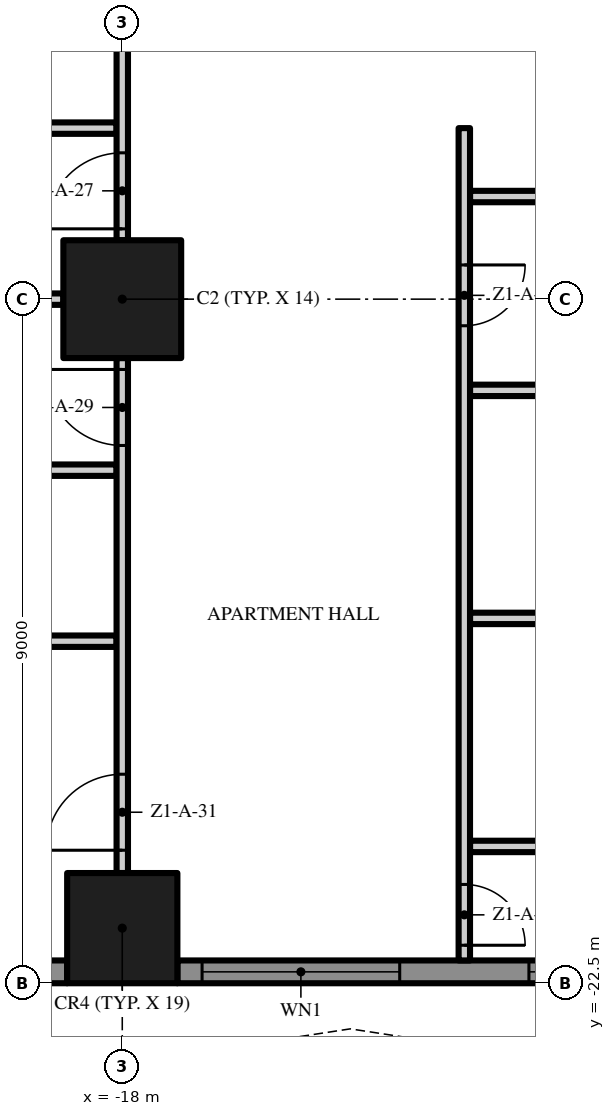
"""IFC4 building model, lengths in metres.
Left out: names, types, materials, properties, quantities, classifications, styles, units other than length and angle.
Written with IfcOpenShell. Run it as: python <this file> out.ifc"""

import sys

from ifc_helpers import new_model, si_unit, direction, frame, frame_2d, origin, origin_2d, place, context, subcontext, project, spatial, polyline, rectangle, outline, extrude, element, fill, save


model = new_model("IFC4")
c1 = context("Model", 3, precision=1e-05, world=origin(), true_north=direction((0.0, 1.0)))
c2 = subcontext(c1, "Body", "Model", "MODEL_VIEW")
j1 = project(units=[si_unit("LENGTHUNIT", "METRE"), si_unit("PLANEANGLEUNIT", "RADIAN")], contexts=[c1])
p1 = place(None, origin())
s1 = spatial("IfcSite", under=j1, at=p1, CompositionType="ELEMENT")
p2 = place(p1, origin())
s2 = spatial("IfcBuilding", under=s1, at=p2, CompositionType="ELEMENT")
p3 = place(p2, frame((0.0, 0.0, 22.6)))
s3 = spatial("IfcBuildingStorey", under=s2, at=p3, CompositionType="ELEMENT", Elevation=22.6)
p4 = place(p3, frame((-18.0, -13.5, 0.0), z_axis=(0.0, 0.0, 1.0), x_axis=(1.0, 0.0, 0.0)))
e1 = element("IfcColumn", 1, at=p4, inside=s3, PredefinedType="COLUMN", context=c2, shape_type="SweptSolid", body=[
    extrude(rectangle(XDim=1.55, YDim=1.55, at=origin_2d()), origin(), (0.0, 0.0, 1.0), 3.5),
])
p5 = place(p3, frame((-18.0, -21.775, 0.0), z_axis=(0.0, 0.0, 1.0), x_axis=(1.0, 0.0, 0.0)))
e2 = element("IfcColumn", 2, at=p5, inside=s3, PredefinedType="COLUMN", context=c2, shape_type="SweptSolid", body=[
    extrude(rectangle(XDim=1.45, YDim=1.45, at=origin_2d()), origin(), (0.0, 0.0, 1.0), 3.5),
])
p6 = place(p3, frame((-18.725, -22.35, 0.0), z_axis=(0.0, 0.0, 1.0), x_axis=(-1.0, 0.0, 0.0)))
e3 = element("IfcWall", 3, at=p6, inside=s3, PredefinedType="SOLIDWALL", context=c2, shape_type="SweptSolid", body=[
    extrude(rectangle(XDim=3.475, YDim=0.3, at=frame_2d((1.738, 0.0))), origin(), (0.0, 0.0, 1.0), 3.5),
])
p7 = place(p6, frame((0.325, 0.0, 0.0)))
e4 = element("IfcOpeningElement", 4, at=p7, cuts=e3, PredefinedType="OPENING", context=c2, shape_type="SweptSolid", body=[
    extrude(rectangle(XDim=2.6, YDim=2.4, at=frame_2d((1.3, 1.2))), frame((0.0, 0.16, 0.0), z_axis=(0.0, -1.0, 0.0), x_axis=(1.0, 0.0, 0.0)), (0.0, 0.0, 1.0), 0.32),
])
p8 = place(p3, frame((-9.725, -22.35, 0.0), z_axis=(0.0, 0.0, 1.0), x_axis=(-1.0, 0.0, 0.0)))
e5 = element("IfcWall", 5, at=p8, inside=s3, PredefinedType="SOLIDWALL", context=c2, shape_type="SweptSolid", body=[
    extrude(rectangle(XDim=7.55, YDim=0.3, at=frame_2d((3.775, 0.0))), origin(), (0.0, 0.0, 1.0), 3.5),
])
p9 = place(p8, frame((4.625, 0.0, 0.45)))
e6 = element("IfcOpeningElement", 6, at=p9, cuts=e5, PredefinedType="OPENING", context=c2, shape_type="SweptSolid", body=[
    extrude(rectangle(XDim=2.6, YDim=2.65, at=frame_2d((1.3, 1.325))), frame((0.0, 0.16, 0.0), z_axis=(0.0, -1.0, 0.0), x_axis=(1.0, 0.0, 0.0)), (0.0, 0.0, 1.0), 0.32),
])
p10 = place(p8, frame((0.325, 0.0, 0.45)))
e7 = element("IfcOpeningElement", 7, at=p10, cuts=e5, PredefinedType="OPENING", context=c2, shape_type="SweptSolid", body=[
    extrude(rectangle(XDim=2.6, YDim=2.65, at=frame_2d((1.3, 1.325))), frame((0.0, 0.16, 0.0), z_axis=(0.0, -1.0, 0.0), x_axis=(1.0, 0.0, 0.0)), (0.0, 0.0, 1.0), 0.32),
])
p11 = place(p3, origin())
e8 = element("IfcWall", 8, at=p11, inside=s3, PredefinedType="USERDEFINED", context=c2, shape_type="SweptSolid", body=[
    extrude(outline(polyline([(-22.5, -25.5), (-21.0, -25.271), (-19.5, -24.671), (-18.0, -23.929), (-16.5, -23.329), (-15.0, -23.1), (-13.5, -23.329), (-12.0, -23.929), (-10.5, -24.671), (-9.0, -25.271), (-7.5, -25.5), (-6.0, -25.271), (-4.5, -24.671), (-3.0, -23.929), (-1.5, -23.329), (0.0, -23.1), (1.5, -23.329), (3.0, -23.929), (4.5, -24.671), (6.0, -25.271), (7.5, -25.5), (9.0, -25.271), (10.5, -24.671), (12.0, -23.929), (13.5, -23.329), (15.0, -23.1), (16.5, -23.329), (18.0, -23.929), (19.5, -24.671), (21.0, -25.271), (22.5, -25.5), (22.538, -25.253), (21.066, -25.028), (19.602, -24.442), (18.102, -23.701), (16.566, -23.086), (15.0, -22.847), (13.434, -23.086), (11.898, -23.701), (10.398, -24.442), (8.934, -25.028), (7.5, -25.247), (6.066, -25.028), (4.602, -24.442), (3.102, -23.701), (1.566, -23.086), (0.0, -22.847), (-1.566, -23.086), (-3.102, -23.701), (-4.602, -24.442), (-6.066, -25.028), (-7.5, -25.247), (-8.934, -25.028), (-10.398, -24.442), (-11.898, -23.701), (-13.434, -23.086), (-15.0, -22.847), (-16.566, -23.086), (-18.102, -23.701), (-19.602, -24.442), (-21.066, -25.028), (-22.538, -25.253), (-22.5, -25.5)])), origin(), (0.0, 0.0, 1.0), 0.9),
])
p12 = place(p3, frame((-13.425, -20.7, 0.0), z_axis=(0.0, 0.0, 1.0), x_axis=(1.0, 0.0, 0.0)))
e9 = element("IfcWall", 9, at=p12, inside=s3, PredefinedType="PARTITIONING", context=c2, shape_type="SweptSolid", body=[
    extrude(rectangle(XDim=4.35, YDim=0.15, at=frame_2d((2.175, 0.0))), origin(), (0.0, 0.0, 1.0), 3.5),
])
p13 = place(p3, frame((-21.775, -18.0, 0.0), z_axis=(0.0, 0.0, 1.0), x_axis=(1.0, 0.0, 0.0)))
e10 = element("IfcWall", 10, at=p13, inside=s3, PredefinedType="PARTITIONING", context=c2, shape_type="SweptSolid", body=[
    extrude(rectangle(XDim=3.7, YDim=0.15, at=frame_2d((1.85, 0.0))), origin(), (0.0, 0.0, 1.0), 3.5),
])
p14 = place(p3, frame((-13.425, -17.7, 0.0), z_axis=(0.0, 0.0, 1.0), x_axis=(1.0, 0.0, 0.0)))
e11 = element("IfcWall", 11, at=p14, inside=s3, PredefinedType="PARTITIONING", context=c2, shape_type="SweptSolid", body=[
    extrude(rectangle(XDim=4.35, YDim=0.15, at=frame_2d((2.175, 0.0))), origin(), (0.0, 0.0, 1.0), 3.5),
])
p15 = place(p3, frame((-20.925, -15.75, 0.0), z_axis=(0.0, 0.0, 1.0), x_axis=(1.0, 0.0, 0.0)))
e12 = element("IfcWall", 12, at=p15, inside=s3, PredefinedType="PARTITIONING", context=c2, shape_type="SweptSolid", body=[
    extrude(rectangle(XDim=2.85, YDim=0.15, at=frame_2d((1.425, 0.0))), origin(), (0.0, 0.0, 1.0), 3.5),
])
p16 = place(p3, frame((-13.425, -14.7, 0.0), z_axis=(0.0, 0.0, 1.0), x_axis=(1.0, 0.0, 0.0)))
e13 = element("IfcWall", 13, at=p16, inside=s3, PredefinedType="PARTITIONING", context=c2, shape_type="SweptSolid", body=[
    extrude(rectangle(XDim=4.35, YDim=0.15, at=frame_2d((2.175, 0.0))), origin(), (0.0, 0.0, 1.0), 3.5),
])
p17 = place(p3, frame((-25.55, -13.5, 0.0), z_axis=(0.0, 0.0, 1.0), x_axis=(1.0, 0.0, 0.0)))
e14 = element("IfcWall", 14, at=p17, inside=s3, PredefinedType="PARTITIONING", context=c2, shape_type="SweptSolid", body=[
    extrude(rectangle(XDim=6.775, YDim=0.15, at=frame_2d((3.388, 0.0))), origin(), (0.0, 0.0, 1.0), 3.5),
])
p18 = place(p3, frame((-13.425, -12.15, 0.0), z_axis=(0.0, 0.0, 1.0), x_axis=(1.0, 0.0, 0.0)))
e15 = element("IfcWall", 15, at=p18, inside=s3, PredefinedType="PARTITIONING", context=c2, shape_type="SweptSolid", body=[
    extrude(rectangle(XDim=4.35, YDim=0.15, at=frame_2d((2.175, 0.0))), origin(), (0.0, 0.0, 1.0), 3.5),
])
p19 = place(p3, frame((-20.925, -11.25, 0.0), z_axis=(0.0, 0.0, 1.0), x_axis=(1.0, 0.0, 0.0)))
e16 = element("IfcWall", 16, at=p19, inside=s3, PredefinedType="PARTITIONING", context=c2, shape_type="SweptSolid", body=[
    extrude(rectangle(XDim=2.85, YDim=0.15, at=frame_2d((1.425, 0.0))), origin(), (0.0, 0.0, 1.0), 3.5),
])
p20 = place(p3, frame((-18.0, -21.05, 0.0), z_axis=(0.0, 0.0, 1.0), x_axis=(0.0, 1.0, 0.0)))
e17 = element("IfcWall", 17, at=p20, inside=s3, PredefinedType="PARTITIONING", context=c2, shape_type="SweptSolid", body=[
    extrude(rectangle(XDim=6.775, YDim=0.15, at=frame_2d((3.388, 0.0))), origin(), (0.0, 0.0, 1.0), 3.5),
])
p21 = place(p20, frame((5.625, 0.0, 0.0)))
e18 = element("IfcOpeningElement", 18, at=p21, cuts=e17, PredefinedType="OPENING", context=c2, shape_type="SweptSolid", body=[
    extrude(rectangle(XDim=1.0, YDim=2.4, at=frame_2d((0.5, 1.2))), frame((0.0, 0.085, 0.0), z_axis=(0.0, -1.0, 0.0), x_axis=(1.0, 0.0, 0.0)), (0.0, 0.0, 1.0), 0.17),
])
p22 = place(p20, frame((0.3, 0.0, 0.0)))
e19 = element("IfcOpeningElement", 19, at=p22, cuts=e17, PredefinedType="OPENING", context=c2, shape_type="SweptSolid", body=[
    extrude(rectangle(XDim=1.0, YDim=2.4, at=frame_2d((0.5, 1.2))), frame((0.0, 0.085, 0.0), z_axis=(0.0, -1.0, 0.0), x_axis=(1.0, 0.0, 0.0)), (0.0, 0.0, 1.0), 0.17),
])
p23 = place(p3, frame((-18.0, -12.725, 0.0), z_axis=(0.0, 0.0, 1.0), x_axis=(0.0, 1.0, 0.0)))
e20 = element("IfcWall", 20, at=p23, inside=s3, PredefinedType="PARTITIONING", context=c2, shape_type="SweptSolid", body=[
    extrude(rectangle(XDim=7.45, YDim=0.15, at=frame_2d((3.725, 0.0))), origin(), (0.0, 0.0, 1.0), 3.5),
])
p24 = place(p23, frame((5.5, 0.0, 0.0)))
e21 = element("IfcOpeningElement", 21, at=p24, cuts=e20, PredefinedType="OPENING", context=c2, shape_type="SweptSolid", body=[
    extrude(rectangle(XDim=1.8, YDim=2.4, at=frame_2d((0.9, 1.2))), frame((0.0, 0.085, 0.0), z_axis=(0.0, -1.0, 0.0), x_axis=(1.0, 0.0, 0.0)), (0.0, 0.0, 1.0), 0.17),
])
p25 = place(p23, frame((0.15, 0.0, 0.0)))
e22 = element("IfcOpeningElement", 22, at=p25, cuts=e20, PredefinedType="OPENING", context=c2, shape_type="SweptSolid", body=[
    extrude(rectangle(XDim=1.0, YDim=2.4, at=frame_2d((0.5, 1.2))), frame((0.0, 0.085, 0.0), z_axis=(0.0, -1.0, 0.0), x_axis=(1.0, 0.0, 0.0)), (0.0, 0.0, 1.0), 0.17),
])
p26 = place(p3, frame((-13.5, -11.25, 0.0), z_axis=(0.0, 0.0, 1.0), x_axis=(0.0, -1.0, 0.0)))
e23 = element("IfcWall", 23, at=p26, inside=s3, PredefinedType="PARTITIONING", context=c2, shape_type="SweptSolid", body=[
    extrude(rectangle(XDim=10.95, YDim=0.15, at=frame_2d((5.475, 0.0))), origin(), (0.0, 0.0, 1.0), 3.5),
])
p27 = place(p26, frame((1.8, 0.0, 0.0)))
e24 = element("IfcOpeningElement", 24, at=p27, cuts=e23, PredefinedType="OPENING", context=c2, shape_type="SweptSolid", body=[
    extrude(rectangle(XDim=0.8, YDim=2.0, at=frame_2d((0.4, 1.0))), frame((0.0, 0.085, 0.0), z_axis=(0.0, -1.0, 0.0), x_axis=(1.0, 0.0, 0.0)), (0.0, 0.0, 1.0), 0.17),
])
p28 = place(p26, frame((9.95, 0.0, 0.0)))
e25 = element("IfcOpeningElement", 25, at=p28, cuts=e23, PredefinedType="OPENING", context=c2, shape_type="SweptSolid", body=[
    extrude(rectangle(XDim=0.8, YDim=2.0, at=frame_2d((0.4, 1.0))), frame((0.0, 0.085, 0.0), z_axis=(0.0, -1.0, 0.0), x_axis=(1.0, 0.0, 0.0)), (0.0, 0.0, 1.0), 0.17),
])
p29 = place(p9, origin())
e26 = element("IfcWindow", 26, at=p29, inside=s3, PartitioningType="SINGLE_PANEL", PredefinedType="WINDOW", context=c2, shape_type="SweptSolid", body=[
    extrude(rectangle(XDim=2.6, YDim=2.65, at=frame_2d((1.3, 1.325))), frame((0.0, 0.03, 0.0), z_axis=(0.0, -1.0, 0.0), x_axis=(1.0, 0.0, 0.0)), (0.0, 0.0, 1.0), 0.06),
])
fill(e6, e26)
p30 = place(p10, origin())
e27 = element("IfcWindow", 27, at=p30, inside=s3, PartitioningType="SINGLE_PANEL", PredefinedType="WINDOW", context=c2, shape_type="SweptSolid", body=[
    extrude(rectangle(XDim=2.6, YDim=2.65, at=frame_2d((1.3, 1.325))), frame((0.0, 0.03, 0.0), z_axis=(0.0, -1.0, 0.0), x_axis=(1.0, 0.0, 0.0)), (0.0, 0.0, 1.0), 0.06),
])
fill(e7, e27)
p31 = place(p27, origin())
e28 = element("IfcDoor", 28, at=p31, inside=s3, OperationType="SINGLE_SWING_LEFT", PredefinedType="DOOR", context=c2, shape_type="SweptSolid", body=[
    extrude(rectangle(XDim=0.8, YDim=2.0, at=frame_2d((0.4, 1.0))), frame((0.0, 0.025, 0.0), z_axis=(0.0, -1.0, 0.0), x_axis=(1.0, 0.0, 0.0)), (0.0, 0.0, 1.0), 0.05),
])
fill(e24, e28)
p32 = place(p28, origin())
e29 = element("IfcDoor", 29, at=p32, inside=s3, OperationType="SINGLE_SWING_RIGHT", PredefinedType="DOOR", context=c2, shape_type="SweptSolid", body=[
    extrude(rectangle(XDim=0.8, YDim=2.0, at=frame_2d((0.4, 1.0))), frame((0.0, 0.025, 0.0), z_axis=(0.0, -1.0, 0.0), x_axis=(1.0, 0.0, 0.0)), (0.0, 0.0, 1.0), 0.05),
])
fill(e25, e29)
p33 = place(p25, origin())
e30 = element("IfcDoor", 30, at=p33, inside=s3, OperationType="SINGLE_SWING_LEFT", PredefinedType="DOOR", context=c2, shape_type="SweptSolid", body=[
    extrude(rectangle(XDim=1.0, YDim=2.4, at=frame_2d((0.5, 1.2))), frame((0.0, 0.025, 0.0), z_axis=(0.0, -1.0, 0.0), x_axis=(1.0, 0.0, 0.0)), (0.0, 0.0, 1.0), 0.05),
])
fill(e22, e30)
p34 = place(p21, origin())
e31 = element("IfcDoor", 31, at=p34, inside=s3, OperationType="SINGLE_SWING_RIGHT", PredefinedType="DOOR", context=c2, shape_type="SweptSolid", body=[
    extrude(rectangle(XDim=1.0, YDim=2.4, at=frame_2d((0.5, 1.2))), frame((0.0, 0.025, 0.0), z_axis=(0.0, -1.0, 0.0), x_axis=(1.0, 0.0, 0.0)), (0.0, 0.0, 1.0), 0.05),
])
fill(e18, e31)
p35 = place(p22, origin())
e32 = element("IfcDoor", 32, at=p35, inside=s3, OperationType="SINGLE_SWING_LEFT", PredefinedType="DOOR", context=c2, shape_type="SweptSolid", body=[
    extrude(rectangle(XDim=1.0, YDim=2.4, at=frame_2d((0.5, 1.2))), frame((0.0, 0.025, 0.0), z_axis=(0.0, -1.0, 0.0), x_axis=(1.0, 0.0, 0.0)), (0.0, 0.0, 1.0), 0.05),
])
fill(e19, e32)
save(model, sys.argv[1])
